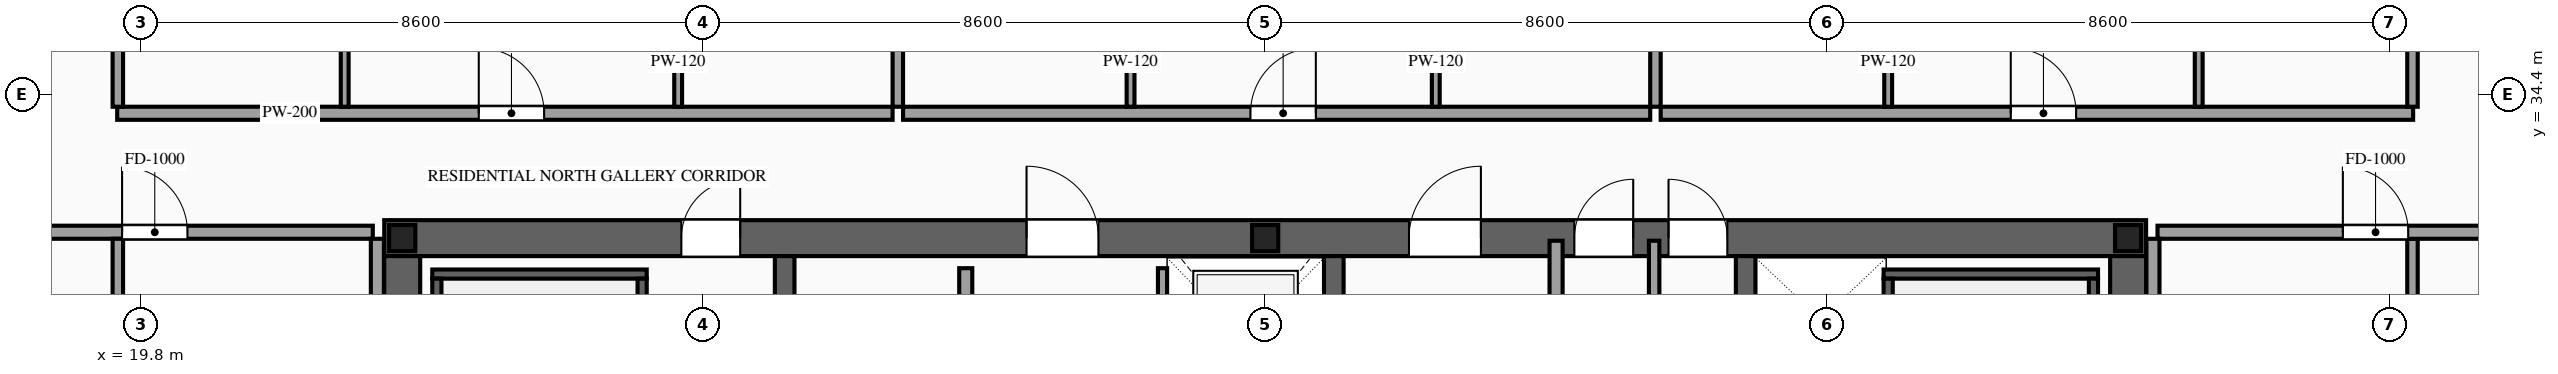
"""IFC4 building model, lengths in metres.
Left out: names, types, materials, properties, quantities, classifications, styles, units other than length and angle.
Written with IfcOpenShell. Run it as: python <this file> out.ifc"""

import sys

from ifc_helpers import new_model, si_unit, direction, frame, frame_2d, origin, origin_2d, place, context, subcontext, project, spatial, rectangle, i_section, extrude, source, transform, mapped, element, fill, save


model = new_model("IFC4")
c1 = context("Model", 3, precision=1e-05, world=origin(), true_north=direction((0.0, 1.0)))
c2 = subcontext(c1, "Body", "Model", "MODEL_VIEW")
j1 = project(units=[si_unit("LENGTHUNIT", "METRE"), si_unit("PLANEANGLEUNIT", "RADIAN")], contexts=[c1])
p1 = place(None, origin())
s1 = spatial("IfcSite", under=j1, at=p1, CompositionType="ELEMENT")
p2 = place(p1, origin())
s2 = spatial("IfcBuilding", under=s1, at=p2, CompositionType="ELEMENT")
p3 = place(p2, frame((0.0, 0.0, 234.6)))
s3 = spatial("IfcBuildingStorey", under=s2, at=p3, CompositionType="ELEMENT", Elevation=234.6)
p4 = place(p3, frame((23.525, 32.2, 0.0), z_axis=(0.0, 0.0, 1.0), x_axis=(1.0, 0.0, 0.0)))
e1 = element("IfcWall", 1, at=p4, inside=s3, PredefinedType="SHEAR", context=c2, shape_type="SweptSolid", body=[
    extrude(rectangle(XDim=26.95, YDim=0.55, at=frame_2d((13.475, 0.0))), origin(), (0.0, 0.0, 1.0), 3.5),
])
p5 = place(p4, frame((4.545, 0.0, 0.0)))
e2 = element("IfcOpeningElement", 2, at=p5, cuts=e1, PredefinedType="OPENING", context=c2, shape_type="SweptSolid", body=[
    extrude(rectangle(XDim=0.9, YDim=2.15, at=frame_2d((0.45, 1.075))), frame((0.0, 0.29, 0.0), z_axis=(0.0, -1.0, 0.0), x_axis=(1.0, 0.0, 0.0)), (0.0, 0.0, 1.0), 0.58),
])
p6 = place(p4, frame((9.825, 0.0, 0.0)))
e3 = element("IfcOpeningElement", 3, at=p6, cuts=e1, PredefinedType="OPENING", context=c2, shape_type="SweptSolid", body=[
    extrude(rectangle(XDim=1.1, YDim=2.2, at=frame_2d((0.55, 1.1))), frame((0.0, 0.29, 0.0), z_axis=(0.0, -1.0, 0.0), x_axis=(1.0, 0.0, 0.0)), (0.0, 0.0, 1.0), 0.58),
])
p7 = place(p4, frame((15.675, 0.0, 0.0)))
e4 = element("IfcOpeningElement", 4, at=p7, cuts=e1, PredefinedType="OPENING", context=c2, shape_type="SweptSolid", body=[
    extrude(rectangle(XDim=1.1, YDim=2.2, at=frame_2d((0.55, 1.1))), frame((0.0, 0.29, 0.0), z_axis=(0.0, -1.0, 0.0), x_axis=(1.0, 0.0, 0.0)), (0.0, 0.0, 1.0), 0.58),
])
p8 = place(p4, frame((18.205, 0.0, 0.0)))
e5 = element("IfcOpeningElement", 5, at=p8, cuts=e1, PredefinedType="OPENING", context=c2, shape_type="SweptSolid", body=[
    extrude(rectangle(XDim=0.9, YDim=2.15, at=frame_2d((0.45, 1.075))), frame((0.0, 0.29, 0.0), z_axis=(0.0, -1.0, 0.0), x_axis=(1.0, 0.0, 0.0)), (0.0, 0.0, 1.0), 0.58),
])
p9 = place(p4, frame((19.645, 0.0, 0.0)))
e6 = element("IfcOpeningElement", 6, at=p9, cuts=e1, PredefinedType="OPENING", context=c2, shape_type="SweptSolid", body=[
    extrude(rectangle(XDim=0.9, YDim=2.15, at=frame_2d((0.45, 1.075))), frame((0.0, 0.29, 0.0), z_axis=(0.0, -1.0, 0.0), x_axis=(1.0, 0.0, 0.0)), (0.0, 0.0, 1.0), 0.58),
])
m1 = source(origin(), c2, "Body", "SweptSolid", [
    extrude(rectangle(XDim=12.25, YDim=0.55, at=frame_2d((6.125, 0.0))), origin(), (0.0, 0.0, 1.0), 3.5),
])
for number, where, z_axis, x_axis in (
    (7, (23.8, 19.675, 0.0), (0.0, 0.0, 1.0), (0.0, 1.0, 0.0)),
    (8, (50.2, 19.675, 0.0), (0.0, 0.0, 1.0), (0.0, 1.0, 0.0)),
):
    element("IfcWall", number, at=place(p3, frame(where, z_axis=z_axis, x_axis=x_axis)), inside=s3, PredefinedType="SHEAR", context=c2, shape_type="MappedRepresentation", body=[
        mapped(m1, transform((0.0, 0.0, 0.0), scale=1.0)),
    ])
m2 = source(origin(), c2, "Body", "SweptSolid", [
    extrude(rectangle(XDim=12.25, YDim=0.3, at=frame_2d((6.125, 0.0))), origin(), (0.0, 0.0, 1.0), 3.5),
])
for number, where, z_axis, x_axis in (
    (9, (29.65, 19.675, 0.0), (0.0, 0.0, 1.0), (0.0, 1.0, 0.0)),
    (10, (38.05, 19.675, 0.0), (0.0, 0.0, 1.0), (0.0, 1.0, 0.0)),
    (11, (44.35, 19.675, 0.0), (0.0, 0.0, 1.0), (0.0, 1.0, 0.0)),
):
    element("IfcWall", number, at=place(p3, frame(where, z_axis=z_axis, x_axis=x_axis)), inside=s3, PredefinedType="SOLIDWALL", context=c2, shape_type="MappedRepresentation", body=[
        mapped(m2, transform((0.0, 0.0, 0.0), scale=1.0)),
    ])
m3 = source(origin(), c2, "Body", "SweptSolid", [
    extrude(i_section(OverallWidth=0.4, OverallDepth=0.4, WebThickness=0.013, FlangeThickness=0.021, at=origin_2d()), origin(), (0.0, 0.0, 1.0), 3.5),
])
for number, where, z_axis, x_axis in (
    (12, (23.8, 32.2, 0.0), (0.0, 0.0, 1.0), (1.0, 0.0, 0.0)),
    (13, (37.0, 32.2, 0.0), (0.0, 0.0, 1.0), (1.0, 0.0, 0.0)),
    (14, (50.2, 32.2, 0.0), (0.0, 0.0, 1.0), (1.0, 0.0, 0.0)),
):
    element("IfcColumn", number, at=place(p3, frame(where, z_axis=z_axis, x_axis=x_axis)), inside=s3, PredefinedType="COLUMN", context=c2, shape_type="MappedRepresentation", body=[
        mapped(m3, transform((0.0, 0.0, 0.0), scale=1.0)),
    ])
p10 = place(p3, frame((35.43, 29.4, 0.0), z_axis=(0.0, 0.0, 1.0), x_axis=(0.0, 1.0, 0.0)))
e15 = element("IfcWall", 15, at=p10, inside=s3, PredefinedType="SOLIDWALL", context=c2, shape_type="SweptSolid", body=[
    extrude(rectangle(XDim=2.34, YDim=0.14, at=frame_2d((1.17, 0.0))), origin(), (0.0, 0.0, 1.0), 3.28),
])
p11 = place(p10, frame((0.62, 0.0, 0.0)))
e16 = element("IfcOpeningElement", 16, at=p11, cuts=e15, PredefinedType="OPENING", context=c2, shape_type="SweptSolid", body=[
    extrude(rectangle(XDim=1.1, YDim=2.2, at=frame_2d((0.55, 1.1))), frame((0.0, 0.085, 0.0), z_axis=(0.0, -1.0, 0.0), x_axis=(1.0, 0.0, 0.0)), (0.0, 0.0, 1.0), 0.17),
])
m4 = source(origin(), c2, "Body", "SweptSolid", [
    extrude(rectangle(XDim=3.28, YDim=0.14, at=frame_2d((1.64, 0.0))), origin(), (0.0, 0.0, 1.0), 3.28),
])
p12 = place(p3, frame((24.26, 31.65, 0.0), z_axis=(0.0, 0.0, 1.0), x_axis=(1.0, 0.0, 0.0)))
e17 = element("IfcWall", 17, at=p12, inside=s3, PredefinedType="SOLIDWALL", context=c2, shape_type="MappedRepresentation", body=[
    mapped(m4, transform((0.0, 0.0, 0.0), scale=1.0)),
])
m5 = source(origin(), c2, "Body", "SweptSolid", [
    extrude(rectangle(XDim=8.94, YDim=0.14, at=frame_2d((4.47, 0.0))), origin(), (0.0, 0.0, 1.0), 3.28),
])
for number, where, z_axis, x_axis in (
    (18, (24.33, 22.64, 0.0), (0.0, 0.0, 1.0), (0.0, 1.0, 0.0)),
    (19, (27.47, 22.64, 0.0), (0.0, 0.0, 1.0), (0.0, 1.0, 0.0)),
):
    element("IfcWall", number, at=place(p3, frame(where, z_axis=z_axis, x_axis=x_axis)), inside=s3, PredefinedType="SOLIDWALL", context=c2, shape_type="MappedRepresentation", body=[
        mapped(m5, transform((0.0, 0.0, 0.0), scale=1.0)),
    ])
p13 = place(p3, frame((46.46, 31.65, 0.0), z_axis=(0.0, 0.0, 1.0), x_axis=(1.0, 0.0, 0.0)))
e20 = element("IfcWall", 20, at=p13, inside=s3, PredefinedType="SOLIDWALL", context=c2, shape_type="MappedRepresentation", body=[
    mapped(m4, transform((0.0, 0.0, 0.0), scale=1.0)),
])
for number, where, z_axis, x_axis in (
    (21, (46.53, 22.64, 0.0), (0.0, 0.0, 1.0), (0.0, 1.0, 0.0)),
    (22, (49.67, 22.64, 0.0), (0.0, 0.0, 1.0), (0.0, 1.0, 0.0)),
):
    element("IfcWall", number, at=place(p3, frame(where, z_axis=z_axis, x_axis=x_axis)), inside=s3, PredefinedType="SOLIDWALL", context=c2, shape_type="MappedRepresentation", body=[
        mapped(m5, transform((0.0, 0.0, 0.0), scale=1.0)),
    ])
p14 = place(p3, frame((32.42, 28.05, 0.0), z_axis=(0.0, 0.0, 1.0), x_axis=(0.0, 1.0, 0.0)))
e23 = element("IfcWall", 23, at=p14, inside=s3, PredefinedType="PARTITIONING", context=c2, shape_type="SweptSolid", body=[
    extrude(rectangle(XDim=3.69, YDim=0.2, at=frame_2d((1.845, 0.0))), origin(), (0.0, 0.0, 1.0), 3.28),
])
p15 = place(p14, frame((1.395, 0.0, 0.0)))
e24 = element("IfcOpeningElement", 24, at=p15, cuts=e23, PredefinedType="OPENING", context=c2, shape_type="SweptSolid", body=[
    extrude(rectangle(XDim=0.9, YDim=2.15, at=frame_2d((0.45, 1.075))), frame((0.0, 0.115, 0.0), z_axis=(0.0, -1.0, 0.0), x_axis=(1.0, 0.0, 0.0)), (0.0, 0.0, 1.0), 0.23),
])
m6 = source(origin(), c2, "Body", "SweptSolid", [
    extrude(rectangle(XDim=5.96, YDim=0.2, at=frame_2d((2.98, 0.0))), origin(), (0.0, 0.0, 1.0), 3.28),
])
p16 = place(p3, frame((41.45, 26.2, 0.0), z_axis=(0.0, 0.0, 1.0), x_axis=(0.0, 1.0, 0.0)))
e25 = element("IfcWall", 25, at=p16, inside=s3, PredefinedType="PARTITIONING", context=c2, shape_type="MappedRepresentation", body=[
    mapped(m6, transform((0.0, 0.0, 0.0), scale=1.0)),
])
m7 = source(origin(), c2, "Body", "SweptSolid", [
    extrude(rectangle(XDim=5.96, YDim=0.16, at=frame_2d((2.98, 0.0))), origin(), (0.0, 0.0, 1.0), 3.28),
])
p17 = place(p3, frame((42.95, 26.2, 0.0), z_axis=(0.0, 0.0, 1.0), x_axis=(0.0, 1.0, 0.0)))
e26 = element("IfcWall", 26, at=p17, inside=s3, PredefinedType="PARTITIONING", context=c2, shape_type="MappedRepresentation", body=[
    mapped(m7, transform((0.0, 0.0, 0.0), scale=1.0)),
])
p18 = place(p3, frame((19.44, 34.11, 0.0), z_axis=(0.0, 0.0, 1.0), x_axis=(1.0, 0.0, 0.0)))
e27 = element("IfcWall", 27, at=p18, inside=s3, PredefinedType="PARTITIONING", context=c2, shape_type="SweptSolid", body=[
    extrude(rectangle(XDim=11.861, YDim=0.2, at=frame_2d((5.931, 0.0))), origin(), (0.0, 0.0, 1.0), 3.28),
])
p19 = place(p18, frame((5.531, 0.0, 0.0)))
e28 = element("IfcOpeningElement", 28, at=p19, cuts=e27, PredefinedType="OPENING", context=c2, shape_type="SweptSolid", body=[
    extrude(rectangle(XDim=1.0, YDim=2.2, at=frame_2d((0.5, 1.1))), frame((0.0, 0.115, 0.0), z_axis=(0.0, -1.0, 0.0), x_axis=(1.0, 0.0, 0.0)), (0.0, 0.0, 1.0), 0.23),
])
m8 = source(origin(), c2, "Body", "SweptSolid", [
    extrude(rectangle(XDim=12.04, YDim=0.16, at=frame_2d((6.02, 0.0))), origin(), (0.0, 0.0, 1.0), 3.28),
])
p20 = place(p3, frame((31.381, 34.21, 0.0), z_axis=(0.0, 0.0, 1.0), x_axis=(0.0, 1.0, 0.0)))
e29 = element("IfcWall", 29, at=p20, inside=s3, PredefinedType="PARTITIONING", context=c2, shape_type="MappedRepresentation", body=[
    mapped(m8, transform((0.0, 0.0, 0.0), scale=1.0)),
])
p21 = place(p3, frame((22.92, 34.21, 0.0), z_axis=(0.0, 0.0, 1.0), x_axis=(0.0, 1.0, 0.0)))
e30 = element("IfcWall", 30, at=p21, inside=s3, PredefinedType="PARTITIONING", context=c2, shape_type="SweptSolid", body=[
    extrude(rectangle(XDim=4.11, YDim=0.12, at=frame_2d((2.055, 0.0))), origin(), (0.0, 0.0, 1.0), 3.28),
])
p22 = place(p21, frame((1.63, 0.0, 0.0)))
e31 = element("IfcOpeningElement", 31, at=p22, cuts=e30, PredefinedType="OPENING", context=c2, shape_type="SweptSolid", body=[
    extrude(rectangle(XDim=0.85, YDim=2.1, at=frame_2d((0.425, 1.05))), frame((0.0, 0.075, 0.0), z_axis=(0.0, -1.0, 0.0), x_axis=(1.0, 0.0, 0.0)), (0.0, 0.0, 1.0), 0.15),
])
p23 = place(p3, frame((28.021, 34.21, 0.0), z_axis=(0.0, 0.0, 1.0), x_axis=(0.0, 1.0, 0.0)))
e32 = element("IfcWall", 32, at=p23, inside=s3, PredefinedType="PARTITIONING", context=c2, shape_type="SweptSolid", body=[
    extrude(rectangle(XDim=4.11, YDim=0.12, at=frame_2d((2.055, 0.0))), origin(), (0.0, 0.0, 1.0), 3.28),
])
p24 = place(p23, frame((1.63, 0.0, 0.0)))
e33 = element("IfcOpeningElement", 33, at=p24, cuts=e32, PredefinedType="OPENING", context=c2, shape_type="SweptSolid", body=[
    extrude(rectangle(XDim=0.85, YDim=2.1, at=frame_2d((0.425, 1.05))), frame((0.0, 0.075, 0.0), z_axis=(0.0, -1.0, 0.0), x_axis=(1.0, 0.0, 0.0)), (0.0, 0.0, 1.0), 0.15),
])
p25 = place(p3, frame((31.461, 34.11, 0.0), z_axis=(0.0, 0.0, 1.0), x_axis=(1.0, 0.0, 0.0)))
e34 = element("IfcWall", 34, at=p25, inside=s3, PredefinedType="PARTITIONING", context=c2, shape_type="SweptSolid", body=[
    extrude(rectangle(XDim=11.429, YDim=0.2, at=frame_2d((5.714, 0.0))), origin(), (0.0, 0.0, 1.0), 3.28),
])
p26 = place(p25, frame((5.314, 0.0, 0.0)))
e35 = element("IfcOpeningElement", 35, at=p26, cuts=e34, PredefinedType="OPENING", context=c2, shape_type="SweptSolid", body=[
    extrude(rectangle(XDim=1.0, YDim=2.2, at=frame_2d((0.5, 1.1))), frame((0.0, 0.115, 0.0), z_axis=(0.0, -1.0, 0.0), x_axis=(1.0, 0.0, 0.0)), (0.0, 0.0, 1.0), 0.23),
])
p27 = place(p3, frame((42.97, 34.21, 0.0), z_axis=(0.0, 0.0, 1.0), x_axis=(0.0, 1.0, 0.0)))
e36 = element("IfcWall", 36, at=p27, inside=s3, PredefinedType="PARTITIONING", context=c2, shape_type="MappedRepresentation", body=[
    mapped(m8, transform((0.0, 0.0, 0.0), scale=1.0)),
])
p28 = place(p3, frame((34.941, 34.21, 0.0), z_axis=(0.0, 0.0, 1.0), x_axis=(0.0, 1.0, 0.0)))
e37 = element("IfcWall", 37, at=p28, inside=s3, PredefinedType="PARTITIONING", context=c2, shape_type="SweptSolid", body=[
    extrude(rectangle(XDim=4.11, YDim=0.12, at=frame_2d((2.055, 0.0))), origin(), (0.0, 0.0, 1.0), 3.28),
])
p29 = place(p28, frame((1.63, 0.0, 0.0)))
e38 = element("IfcOpeningElement", 38, at=p29, cuts=e37, PredefinedType="OPENING", context=c2, shape_type="SweptSolid", body=[
    extrude(rectangle(XDim=0.85, YDim=2.1, at=frame_2d((0.425, 1.05))), frame((0.0, 0.075, 0.0), z_axis=(0.0, -1.0, 0.0), x_axis=(1.0, 0.0, 0.0)), (0.0, 0.0, 1.0), 0.15),
])
p30 = place(p3, frame((39.61, 34.21, 0.0), z_axis=(0.0, 0.0, 1.0), x_axis=(0.0, 1.0, 0.0)))
e39 = element("IfcWall", 39, at=p30, inside=s3, PredefinedType="PARTITIONING", context=c2, shape_type="SweptSolid", body=[
    extrude(rectangle(XDim=4.11, YDim=0.12, at=frame_2d((2.055, 0.0))), origin(), (0.0, 0.0, 1.0), 3.28),
])
p31 = place(p30, frame((1.63, 0.0, 0.0)))
e40 = element("IfcOpeningElement", 40, at=p31, cuts=e39, PredefinedType="OPENING", context=c2, shape_type="SweptSolid", body=[
    extrude(rectangle(XDim=0.85, YDim=2.1, at=frame_2d((0.425, 1.05))), frame((0.0, 0.075, 0.0), z_axis=(0.0, -1.0, 0.0), x_axis=(1.0, 0.0, 0.0)), (0.0, 0.0, 1.0), 0.15),
])
p32 = place(p3, frame((43.05, 34.11, 0.0), z_axis=(0.0, 0.0, 1.0), x_axis=(1.0, 0.0, 0.0)))
e41 = element("IfcWall", 41, at=p32, inside=s3, PredefinedType="PARTITIONING", context=c2, shape_type="SweptSolid", body=[
    extrude(rectangle(XDim=11.51, YDim=0.2, at=frame_2d((5.755, 0.0))), origin(), (0.0, 0.0, 1.0), 3.28),
])
p33 = place(p32, frame((5.355, 0.0, 0.0)))
e42 = element("IfcOpeningElement", 42, at=p33, cuts=e41, PredefinedType="OPENING", context=c2, shape_type="SweptSolid", body=[
    extrude(rectangle(XDim=1.0, YDim=2.2, at=frame_2d((0.5, 1.1))), frame((0.0, 0.115, 0.0), z_axis=(0.0, -1.0, 0.0), x_axis=(1.0, 0.0, 0.0)), (0.0, 0.0, 1.0), 0.23),
])
m9 = source(origin(), c2, "Body", "SweptSolid", [
    extrude(rectangle(XDim=11.89, YDim=0.16, at=frame_2d((5.945, 0.0))), origin(), (0.0, 0.0, 1.0), 3.28),
])
for number, where, z_axis, x_axis in (
    (43, (19.45, 34.21, 0.0), (0.0, 0.0, 1.0), (0.0, 1.0, 0.0)),
    (44, (54.55, 34.21, 0.0), (0.0, 0.0, 1.0), (0.0, 1.0, 0.0)),
):
    element("IfcWall", number, at=place(p3, frame(where, z_axis=z_axis, x_axis=x_axis)), inside=s3, PredefinedType="PARTITIONING", context=c2, shape_type="MappedRepresentation", body=[
        mapped(m9, transform((0.0, 0.0, 0.0), scale=1.0)),
    ])
p34 = place(p3, frame((46.53, 34.21, 0.0), z_axis=(0.0, 0.0, 1.0), x_axis=(0.0, 1.0, 0.0)))
e45 = element("IfcWall", 45, at=p34, inside=s3, PredefinedType="PARTITIONING", context=c2, shape_type="SweptSolid", body=[
    extrude(rectangle(XDim=4.11, YDim=0.12, at=frame_2d((2.055, 0.0))), origin(), (0.0, 0.0, 1.0), 3.28),
])
p35 = place(p34, frame((1.63, 0.0, 0.0)))
e46 = element("IfcOpeningElement", 46, at=p35, cuts=e45, PredefinedType="OPENING", context=c2, shape_type="SweptSolid", body=[
    extrude(rectangle(XDim=0.85, YDim=2.1, at=frame_2d((0.425, 1.05))), frame((0.0, 0.075, 0.0), z_axis=(0.0, -1.0, 0.0), x_axis=(1.0, 0.0, 0.0)), (0.0, 0.0, 1.0), 0.15),
])
p36 = place(p3, frame((51.28, 34.21, 0.0), z_axis=(0.0, 0.0, 1.0), x_axis=(0.0, 1.0, 0.0)))
e47 = element("IfcWall", 47, at=p36, inside=s3, PredefinedType="PARTITIONING", context=c2, shape_type="SweptSolid", body=[
    extrude(rectangle(XDim=4.11, YDim=0.12, at=frame_2d((2.055, 0.0))), origin(), (0.0, 0.0, 1.0), 3.28),
])
p37 = place(p36, frame((1.63, 0.0, 0.0)))
e48 = element("IfcOpeningElement", 48, at=p37, cuts=e47, PredefinedType="OPENING", context=c2, shape_type="SweptSolid", body=[
    extrude(rectangle(XDim=0.85, YDim=2.1, at=frame_2d((0.425, 1.05))), frame((0.0, 0.075, 0.0), z_axis=(0.0, -1.0, 0.0), x_axis=(1.0, 0.0, 0.0)), (0.0, 0.0, 1.0), 0.15),
])
p38 = place(p3, frame((16.55, 32.29, 0.0), z_axis=(0.0, 0.0, 1.0), x_axis=(1.0, 0.0, 0.0)))
e49 = element("IfcWall", 49, at=p38, inside=s3, PredefinedType="PARTITIONING", context=c2, shape_type="SweptSolid", body=[
    extrude(rectangle(XDim=6.8, YDim=0.2, at=frame_2d((3.4, 0.0))), origin(), (0.0, 0.0, 1.0), 2.825),
])
p39 = place(p38, frame((2.965, 0.0, 0.0)))
e50 = element("IfcOpeningElement", 50, at=p39, cuts=e49, PredefinedType="OPENING", context=c2, shape_type="SweptSolid", body=[
    extrude(rectangle(XDim=1.0, YDim=2.2, at=frame_2d((0.5, 1.1))), frame((0.0, 0.115, 0.0), z_axis=(0.0, -1.0, 0.0), x_axis=(1.0, 0.0, 0.0)), (0.0, 0.0, 1.0), 0.23),
])
m10 = source(origin(), c2, "Body", "SweptSolid", [
    extrude(rectangle(XDim=26.69, YDim=0.16, at=frame_2d((13.345, 0.0))), origin(), (0.0, 0.0, 1.0), 3.28),
])
for number, where, z_axis, x_axis in (
    (51, (19.45, 5.5, 0.0), (0.0, 0.0, 1.0), (0.0, 1.0, 0.0)),
    (52, (54.55, 5.5, 0.0), (0.0, 0.0, 1.0), (0.0, 1.0, 0.0)),
):
    element("IfcWall", number, at=place(p3, frame(where, z_axis=z_axis, x_axis=x_axis)), inside=s3, PredefinedType="PARTITIONING", context=c2, shape_type="MappedRepresentation", body=[
        mapped(m10, transform((0.0, 0.0, 0.0), scale=1.0)),
    ])
m11 = source(origin(), c2, "Body", "SweptSolid", [
    extrude(rectangle(XDim=6.29, YDim=0.2, at=frame_2d((3.145, 0.0))), origin(), (0.0, 0.0, 1.0), 3.28),
])
p40 = place(p3, frame((23.42, 25.9, 0.0), z_axis=(0.0, 0.0, 1.0), x_axis=(0.0, 1.0, 0.0)))
e53 = element("IfcWall", 53, at=p40, inside=s3, PredefinedType="PARTITIONING", context=c2, shape_type="MappedRepresentation", body=[
    mapped(m11, transform((0.0, 0.0, 0.0), scale=1.0)),
])
p41 = place(p3, frame((50.65, 32.29, 0.0), z_axis=(0.0, 0.0, 1.0), x_axis=(1.0, 0.0, 0.0)))
e54 = element("IfcWall", 54, at=p41, inside=s3, PredefinedType="PARTITIONING", context=c2, shape_type="SweptSolid", body=[
    extrude(rectangle(XDim=6.8, YDim=0.2, at=frame_2d((3.4, 0.0))), origin(), (0.0, 0.0, 1.0), 2.825),
])
p42 = place(p41, frame((2.835, 0.0, 0.0)))
e55 = element("IfcOpeningElement", 55, at=p42, cuts=e54, PredefinedType="OPENING", context=c2, shape_type="SweptSolid", body=[
    extrude(rectangle(XDim=1.0, YDim=2.2, at=frame_2d((0.5, 1.1))), frame((0.0, 0.115, 0.0), z_axis=(0.0, -1.0, 0.0), x_axis=(1.0, 0.0, 0.0)), (0.0, 0.0, 1.0), 0.23),
])
p43 = place(p3, frame((50.58, 25.9, 0.0), z_axis=(0.0, 0.0, 1.0), x_axis=(0.0, 1.0, 0.0)))
e56 = element("IfcWall", 56, at=p43, inside=s3, PredefinedType="PARTITIONING", context=c2, shape_type="MappedRepresentation", body=[
    mapped(m11, transform((0.0, 0.0, 0.0), scale=1.0)),
])
m12 = source(origin(), c2, "Body", "SweptSolid", [
    extrude(rectangle(XDim=0.9, YDim=2.15, at=frame_2d((0.45, 1.075))), frame((0.0, 0.025, 0.0), z_axis=(0.0, -1.0, 0.0), x_axis=(1.0, 0.0, 0.0)), (0.0, 0.0, 1.0), 0.05),
])
p44 = place(p5, origin())
e57 = element("IfcDoor", 57, at=p44, inside=s3, OperationType="SINGLE_SWING_RIGHT", PredefinedType="DOOR", context=c2, shape_type="MappedRepresentation", body=[
    mapped(m12, transform((0.0, 0.0, 0.0), scale=1.0)),
])
fill(e2, e57)
m13 = source(origin(), c2, "Body", "SweptSolid", [
    extrude(rectangle(XDim=1.1, YDim=2.2, at=frame_2d((0.55, 1.1))), frame((0.0, 0.025, 0.0), z_axis=(0.0, -1.0, 0.0), x_axis=(1.0, 0.0, 0.0)), (0.0, 0.0, 1.0), 0.05),
])
p45 = place(p6, origin())
e58 = element("IfcDoor", 58, at=p45, inside=s3, OperationType="SINGLE_SWING_LEFT", PredefinedType="DOOR", context=c2, shape_type="MappedRepresentation", body=[
    mapped(m13, transform((0.0, 0.0, 0.0), scale=1.0)),
])
fill(e3, e58)
p46 = place(p7, origin())
e59 = element("IfcDoor", 59, at=p46, inside=s3, OperationType="SINGLE_SWING_RIGHT", PredefinedType="DOOR", context=c2, shape_type="MappedRepresentation", body=[
    mapped(m13, transform((0.0, 0.0, 0.0), scale=1.0)),
])
fill(e4, e59)
p47 = place(p8, origin())
e60 = element("IfcDoor", 60, at=p47, inside=s3, OperationType="SINGLE_SWING_RIGHT", PredefinedType="DOOR", context=c2, shape_type="MappedRepresentation", body=[
    mapped(m12, transform((0.0, 0.0, 0.0), scale=1.0)),
])
fill(e5, e60)
p48 = place(p9, origin())
e61 = element("IfcDoor", 61, at=p48, inside=s3, OperationType="SINGLE_SWING_LEFT", PredefinedType="DOOR", context=c2, shape_type="MappedRepresentation", body=[
    mapped(m12, transform((0.0, 0.0, 0.0), scale=1.0)),
])
fill(e6, e61)
m14 = source(origin(), c2, "Body", "SweptSolid", [
    extrude(rectangle(XDim=1.0, YDim=2.2, at=frame_2d((0.5, 1.1))), frame((0.0, 0.025, 0.0), z_axis=(0.0, -1.0, 0.0), x_axis=(1.0, 0.0, 0.0)), (0.0, 0.0, 1.0), 0.05),
])
p49 = place(p19, origin())
e62 = element("IfcDoor", 62, at=p49, inside=s3, OperationType="SINGLE_SWING_LEFT", PredefinedType="DOOR", context=c2, shape_type="MappedRepresentation", body=[
    mapped(m14, transform((0.0, 0.0, 0.0), scale=1.0)),
])
fill(e28, e62)
p50 = place(p26, origin())
e63 = element("IfcDoor", 63, at=p50, inside=s3, OperationType="SINGLE_SWING_RIGHT", PredefinedType="DOOR", context=c2, shape_type="MappedRepresentation", body=[
    mapped(m14, transform((0.0, 0.0, 0.0), scale=1.0)),
])
fill(e35, e63)
p51 = place(p33, origin())
e64 = element("IfcDoor", 64, at=p51, inside=s3, OperationType="SINGLE_SWING_LEFT", PredefinedType="DOOR", context=c2, shape_type="MappedRepresentation", body=[
    mapped(m14, transform((0.0, 0.0, 0.0), scale=1.0)),
])
fill(e42, e64)
p52 = place(p39, origin())
e65 = element("IfcDoor", 65, at=p52, inside=s3, OperationType="SINGLE_SWING_LEFT", PredefinedType="DOOR", context=c2, shape_type="MappedRepresentation", body=[
    mapped(m14, transform((0.0, 0.0, 0.0), scale=1.0)),
])
fill(e50, e65)
p53 = place(p42, origin())
e66 = element("IfcDoor", 66, at=p53, inside=s3, OperationType="SINGLE_SWING_LEFT", PredefinedType="DOOR", context=c2, shape_type="MappedRepresentation", body=[
    mapped(m14, transform((0.0, 0.0, 0.0), scale=1.0)),
])
fill(e55, e66)
save(model, sys.argv[1])
